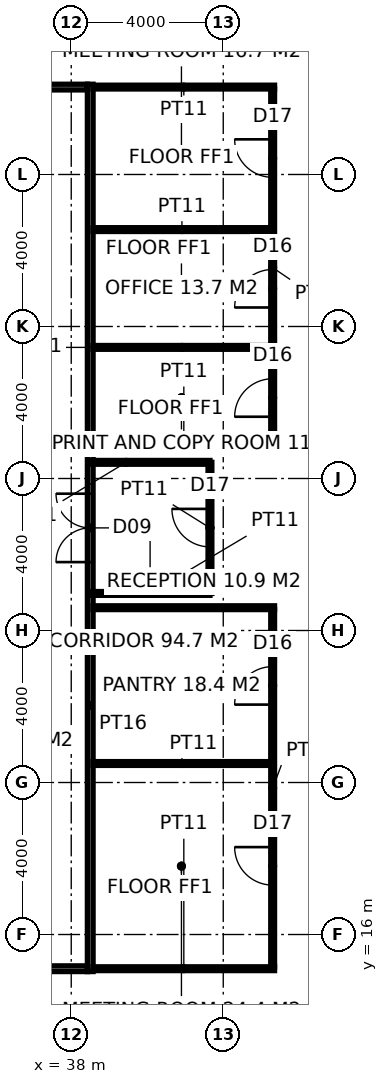
"""IFC4 building model, lengths in metres.
Left out: names, types, materials, properties, quantities, classifications, styles, units other than length and angle.
Written with IfcOpenShell. Run it as: python <this file> out.ifc"""

import sys

from ifc_helpers import new_model, si_unit, direction, frame, frame_2d, origin, place, context, subcontext, project, spatial, rectangle, extrude, element, fill, save


model = new_model("IFC4")
c1 = context("Model", 3, precision=1e-05, world=origin(), true_north=direction((0.0, 1.0)))
c2 = subcontext(c1, "Body", "Model", "MODEL_VIEW")
j1 = project(units=[si_unit("LENGTHUNIT", "METRE"), si_unit("PLANEANGLEUNIT", "RADIAN")], contexts=[c1])
p1 = place(None, origin())
s1 = spatial("IfcSite", under=j1, at=p1, CompositionType="ELEMENT")
p2 = place(p1, origin())
s2 = spatial("IfcBuilding", under=s1, at=p2, CompositionType="ELEMENT")
p3 = place(p2, frame((0.0, 0.0, 286.2)))
s3 = spatial("IfcBuildingStorey", under=s2, at=p3, CompositionType="ELEMENT", Elevation=286.2)
p4 = place(p3, frame((38.5, 15.025, 0.0), z_axis=(0.0, 0.0, 1.0), x_axis=(0.0, 1.0, 0.0)))
e1 = element("IfcWall", 1, at=p4, inside=s3, PredefinedType="PARTITIONING", context=c2, shape_type="SweptSolid", body=[
    extrude(rectangle(XDim=23.35, YDim=0.15, at=frame_2d((11.675, 0.0))), origin(), (0.0, 0.0, 1.0), 3.85),
])
p5 = place(p4, frame((10.775, 0.0, 0.0)))
e2 = element("IfcOpeningElement", 2, at=p5, cuts=e1, PredefinedType="OPENING", context=c2, shape_type="SweptSolid", body=[
    extrude(rectangle(XDim=1.8, YDim=2.4, at=frame_2d((0.9, 1.2))), frame((0.0, 0.085, 0.0), z_axis=(0.0, -1.0, 0.0), x_axis=(1.0, 0.0, 0.0)), (0.0, 0.0, 1.0), 0.17),
])
p6 = place(p3, frame((15.775, 15.1, 0.0), z_axis=(0.0, 0.0, 1.0), x_axis=(1.0, 0.0, 0.0)))
e3 = element("IfcWall", 3, at=p6, inside=s3, PredefinedType="PARTITIONING", context=c2, shape_type="SweptSolid", body=[
    extrude(rectangle(XDim=22.65, YDim=0.15, at=frame_2d((11.325, 0.0))), origin(), (0.0, 0.0, 1.0), 3.85),
])
p7 = place(p3, frame((15.775, 38.3, 0.0), z_axis=(0.0, 0.0, 1.0), x_axis=(1.0, 0.0, 0.0)))
e4 = element("IfcWall", 4, at=p7, inside=s3, PredefinedType="PARTITIONING", context=c2, shape_type="SweptSolid", body=[
    extrude(rectangle(XDim=22.65, YDim=0.15, at=frame_2d((11.325, 0.0))), origin(), (0.0, 0.0, 1.0), 3.85),
])
p8 = place(p7, frame((7.975, 0.0, 0.0)))
e5 = element("IfcOpeningElement", 5, at=p8, cuts=e4, PredefinedType="OPENING", context=c2, shape_type="SweptSolid", body=[
    extrude(rectangle(XDim=0.9, YDim=2.1, at=frame_2d((0.45, 1.05))), frame((0.0, 0.085, 0.0), z_axis=(0.0, -1.0, 0.0), x_axis=(1.0, 0.0, 0.0)), (0.0, 0.0, 1.0), 0.17),
])
p9 = place(p7, frame((11.725, 0.0, 0.0)))
e6 = element("IfcOpeningElement", 6, at=p9, cuts=e4, PredefinedType="OPENING", context=c2, shape_type="SweptSolid", body=[
    extrude(rectangle(XDim=1.0, YDim=2.1, at=frame_2d((0.5, 1.05))), frame((0.0, 0.085, 0.0), z_axis=(0.0, -1.0, 0.0), x_axis=(1.0, 0.0, 0.0)), (0.0, 0.0, 1.0), 0.17),
])
p10 = place(p7, frame((15.575, 0.0, 0.0)))
e7 = element("IfcOpeningElement", 7, at=p10, cuts=e4, PredefinedType="OPENING", context=c2, shape_type="SweptSolid", body=[
    extrude(rectangle(XDim=0.9, YDim=2.1, at=frame_2d((0.45, 1.05))), frame((0.0, 0.085, 0.0), z_axis=(0.0, -1.0, 0.0), x_axis=(1.0, 0.0, 0.0)), (0.0, 0.0, 1.0), 0.17),
])
p11 = place(p3, frame((38.575, 15.1, 0.0), z_axis=(0.0, 0.0, 1.0), x_axis=(1.0, 0.0, 0.0)))
e8 = element("IfcWall", 8, at=p11, inside=s3, PredefinedType="PARTITIONING", context=c2, shape_type="SweptSolid", body=[
    extrude(rectangle(XDim=4.775, YDim=0.1, at=frame_2d((2.388, 0.0))), origin(), (0.0, 0.0, 1.0), 3.85),
])
p12 = place(p3, frame((38.575, 20.5, 0.0), z_axis=(0.0, 0.0, 1.0), x_axis=(1.0, 0.0, 0.0)))
e9 = element("IfcWall", 9, at=p12, inside=s3, PredefinedType="PARTITIONING", context=c2, shape_type="SweptSolid", body=[
    extrude(rectangle(XDim=4.675, YDim=0.1, at=frame_2d((2.337, 0.0))), origin(), (0.0, 0.0, 1.0), 3.85),
])
for number, where, z_axis, x_axis in (
    (10, (38.575, 24.6, 0.0), (0.0, 0.0, 1.0), (1.0, 0.0, 0.0)),
    (11, (38.575, 28.8, 0.0), (0.0, 0.0, 1.0), (1.0, 0.0, 0.0)),
):
    element("IfcWall", number, at=place(p3, frame(where, z_axis=z_axis, x_axis=x_axis)), inside=s3, PredefinedType="PARTITIONING", context=c2, shape_type="SweptSolid", body=[
        extrude(rectangle(XDim=4.775, YDim=0.1, at=frame_2d((2.388, 0.0))), origin(), (0.0, 0.0, 1.0), 3.85),
    ])
for number, where, z_axis, x_axis in (
    (12, (38.575, 31.45, 0.0), (0.0, 0.0, 1.0), (1.0, 0.0, 0.0)),
    (13, (38.575, 34.55, 0.0), (0.0, 0.0, 1.0), (1.0, 0.0, 0.0)),
):
    element("IfcWall", number, at=place(p3, frame(where, z_axis=z_axis, x_axis=x_axis)), inside=s3, PredefinedType="PARTITIONING", context=c2, shape_type="SweptSolid", body=[
        extrude(rectangle(XDim=4.675, YDim=0.1, at=frame_2d((2.337, 0.0))), origin(), (0.0, 0.0, 1.0), 3.85),
    ])
p13 = place(p3, frame((38.575, 38.3, 0.0), z_axis=(0.0, 0.0, 1.0), x_axis=(1.0, 0.0, 0.0)))
e14 = element("IfcWall", 14, at=p13, inside=s3, PredefinedType="PARTITIONING", context=c2, shape_type="SweptSolid", body=[
    extrude(rectangle(XDim=4.775, YDim=0.1, at=frame_2d((2.388, 0.0))), origin(), (0.0, 0.0, 1.0), 3.85),
])
p14 = place(p3, frame((43.3, 15.15, 0.0), z_axis=(0.0, 0.0, 1.0), x_axis=(0.0, 1.0, 0.0)))
e15 = element("IfcWall", 15, at=p14, inside=s3, PredefinedType="PARTITIONING", context=c2, shape_type="SweptSolid", body=[
    extrude(rectangle(XDim=9.4, YDim=0.1, at=frame_2d((4.7, 0.0))), origin(), (0.0, 0.0, 1.0), 3.85),
])
p15 = place(p14, frame((2.15, 0.0, 0.0)))
e16 = element("IfcOpeningElement", 16, at=p15, cuts=e15, PredefinedType="OPENING", context=c2, shape_type="SweptSolid", body=[
    extrude(rectangle(XDim=1.0, YDim=2.2, at=frame_2d((0.5, 1.1))), frame((0.0, 0.06, 0.0), z_axis=(0.0, -1.0, 0.0), x_axis=(1.0, 0.0, 0.0)), (0.0, 0.0, 1.0), 0.12),
])
p16 = place(p14, frame((6.9, 0.0, 0.0)))
e17 = element("IfcOpeningElement", 17, at=p16, cuts=e15, PredefinedType="OPENING", context=c2, shape_type="SweptSolid", body=[
    extrude(rectangle(XDim=1.0, YDim=2.2, at=frame_2d((0.5, 1.1))), frame((0.0, 0.06, 0.0), z_axis=(0.0, -1.0, 0.0), x_axis=(1.0, 0.0, 0.0)), (0.0, 0.0, 1.0), 0.12),
])
p17 = place(p3, frame((43.3, 28.85, 0.0), z_axis=(0.0, 0.0, 1.0), x_axis=(0.0, 1.0, 0.0)))
e18 = element("IfcWall", 18, at=p17, inside=s3, PredefinedType="PARTITIONING", context=c2, shape_type="SweptSolid", body=[
    extrude(rectangle(XDim=9.4, YDim=0.1, at=frame_2d((4.7, 0.0))), origin(), (0.0, 0.0, 1.0), 3.85),
])
p18 = place(p17, frame((0.775, 0.0, 0.0)))
e19 = element("IfcOpeningElement", 19, at=p18, cuts=e18, PredefinedType="OPENING", context=c2, shape_type="SweptSolid", body=[
    extrude(rectangle(XDim=1.0, YDim=2.2, at=frame_2d((0.5, 1.1))), frame((0.0, 0.06, 0.0), z_axis=(0.0, -1.0, 0.0), x_axis=(1.0, 0.0, 0.0)), (0.0, 0.0, 1.0), 0.12),
])
p19 = place(p17, frame((3.65, 0.0, 0.0)))
e20 = element("IfcOpeningElement", 20, at=p19, cuts=e18, PredefinedType="OPENING", context=c2, shape_type="SweptSolid", body=[
    extrude(rectangle(XDim=1.0, YDim=2.2, at=frame_2d((0.5, 1.1))), frame((0.0, 0.06, 0.0), z_axis=(0.0, -1.0, 0.0), x_axis=(1.0, 0.0, 0.0)), (0.0, 0.0, 1.0), 0.12),
])
p20 = place(p17, frame((7.075, 0.0, 0.0)))
e21 = element("IfcOpeningElement", 21, at=p20, cuts=e18, PredefinedType="OPENING", context=c2, shape_type="SweptSolid", body=[
    extrude(rectangle(XDim=1.0, YDim=2.2, at=frame_2d((0.5, 1.1))), frame((0.0, 0.06, 0.0), z_axis=(0.0, -1.0, 0.0), x_axis=(1.0, 0.0, 0.0)), (0.0, 0.0, 1.0), 0.12),
])
p21 = place(p3, frame((38.5, 24.975, 0.0), z_axis=(0.0, 0.0, 1.0), x_axis=(1.0, 0.0, 0.0)))
e22 = element("IfcWall", 22, at=p21, inside=s3, PredefinedType="PARTITIONING", context=c2, shape_type="SweptSolid", body=[
    extrude(rectangle(XDim=3.15, YDim=0.1, at=frame_2d((1.575, 0.0))), origin(), (0.0, 0.0, 1.0), 3.85),
])
p22 = place(p3, frame((41.65, 24.975, 0.0), z_axis=(0.0, 0.0, 1.0), x_axis=(0.0, 1.0, 0.0)))
e23 = element("IfcWall", 23, at=p22, inside=s3, PredefinedType="PARTITIONING", context=c2, shape_type="SweptSolid", body=[
    extrude(rectangle(XDim=3.45, YDim=0.1, at=frame_2d((1.725, 0.0))), origin(), (0.0, 0.0, 1.0), 3.85),
])
p23 = place(p22, frame((1.225, 0.0, 0.0)))
e24 = element("IfcOpeningElement", 24, at=p23, cuts=e23, PredefinedType="OPENING", context=c2, shape_type="SweptSolid", body=[
    extrude(rectangle(XDim=1.0, YDim=2.2, at=frame_2d((0.5, 1.1))), frame((0.0, 0.06, 0.0), z_axis=(0.0, -1.0, 0.0), x_axis=(1.0, 0.0, 0.0)), (0.0, 0.0, 1.0), 0.12),
])
p24 = place(p3, frame((41.65, 28.425, 0.0), z_axis=(0.0, 0.0, 1.0), x_axis=(-1.0, 0.0, 0.0)))
e25 = element("IfcWall", 25, at=p24, inside=s3, PredefinedType="PARTITIONING", context=c2, shape_type="SweptSolid", body=[
    extrude(rectangle(XDim=3.15, YDim=0.1, at=frame_2d((1.575, 0.0))), origin(), (0.0, 0.0, 1.0), 3.85),
])
p25 = place(p5, origin())
e26 = element("IfcDoor", 26, at=p25, inside=s3, OperationType="DOUBLE_DOOR_DOUBLE_SWING", PredefinedType="DOOR", context=c2, shape_type="SweptSolid", body=[
    extrude(rectangle(XDim=1.8, YDim=2.4, at=frame_2d((0.9, 1.2))), frame((0.0, 0.025, 0.0), z_axis=(0.0, -1.0, 0.0), x_axis=(1.0, 0.0, 0.0)), (0.0, 0.0, 1.0), 0.05),
])
fill(e2, e26)
p26 = place(p15, origin())
e27 = element("IfcDoor", 27, at=p26, inside=s3, OperationType="SINGLE_SWING_RIGHT", PredefinedType="DOOR", context=c2, shape_type="SweptSolid", body=[
    extrude(rectangle(XDim=1.0, YDim=2.2, at=frame_2d((0.5, 1.1))), frame((0.0, 0.025, 0.0), z_axis=(0.0, -1.0, 0.0), x_axis=(1.0, 0.0, 0.0)), (0.0, 0.0, 1.0), 0.05),
])
fill(e16, e27)
p27 = place(p16, origin())
e28 = element("IfcDoor", 28, at=p27, inside=s3, OperationType="SINGLE_SWING_LEFT", PredefinedType="DOOR", context=c2, shape_type="SweptSolid", body=[
    extrude(rectangle(XDim=1.0, YDim=2.2, at=frame_2d((0.5, 1.1))), frame((0.0, 0.025, 0.0), z_axis=(0.0, -1.0, 0.0), x_axis=(1.0, 0.0, 0.0)), (0.0, 0.0, 1.0), 0.05),
])
fill(e17, e28)
p28 = place(p18, origin())
e29 = element("IfcDoor", 29, at=p28, inside=s3, OperationType="SINGLE_SWING_LEFT", PredefinedType="DOOR", context=c2, shape_type="SweptSolid", body=[
    extrude(rectangle(XDim=1.0, YDim=2.2, at=frame_2d((0.5, 1.1))), frame((0.0, 0.025, 0.0), z_axis=(0.0, -1.0, 0.0), x_axis=(1.0, 0.0, 0.0)), (0.0, 0.0, 1.0), 0.05),
])
fill(e19, e29)
p29 = place(p19, origin())
e30 = element("IfcDoor", 30, at=p29, inside=s3, OperationType="SINGLE_SWING_LEFT", PredefinedType="DOOR", context=c2, shape_type="SweptSolid", body=[
    extrude(rectangle(XDim=1.0, YDim=2.2, at=frame_2d((0.5, 1.1))), frame((0.0, 0.025, 0.0), z_axis=(0.0, -1.0, 0.0), x_axis=(1.0, 0.0, 0.0)), (0.0, 0.0, 1.0), 0.05),
])
fill(e20, e30)
p30 = place(p20, origin())
e31 = element("IfcDoor", 31, at=p30, inside=s3, OperationType="SINGLE_SWING_RIGHT", PredefinedType="DOOR", context=c2, shape_type="SweptSolid", body=[
    extrude(rectangle(XDim=1.0, YDim=2.2, at=frame_2d((0.5, 1.1))), frame((0.0, 0.025, 0.0), z_axis=(0.0, -1.0, 0.0), x_axis=(1.0, 0.0, 0.0)), (0.0, 0.0, 1.0), 0.05),
])
fill(e21, e31)
p31 = place(p23, origin())
e32 = element("IfcDoor", 32, at=p31, inside=s3, OperationType="SINGLE_SWING_RIGHT", PredefinedType="DOOR", context=c2, shape_type="SweptSolid", body=[
    extrude(rectangle(XDim=1.0, YDim=2.2, at=frame_2d((0.5, 1.1))), frame((0.0, 0.025, 0.0), z_axis=(0.0, -1.0, 0.0), x_axis=(1.0, 0.0, 0.0)), (0.0, 0.0, 1.0), 0.05),
])
fill(e24, e32)
save(model, sys.argv[1])
